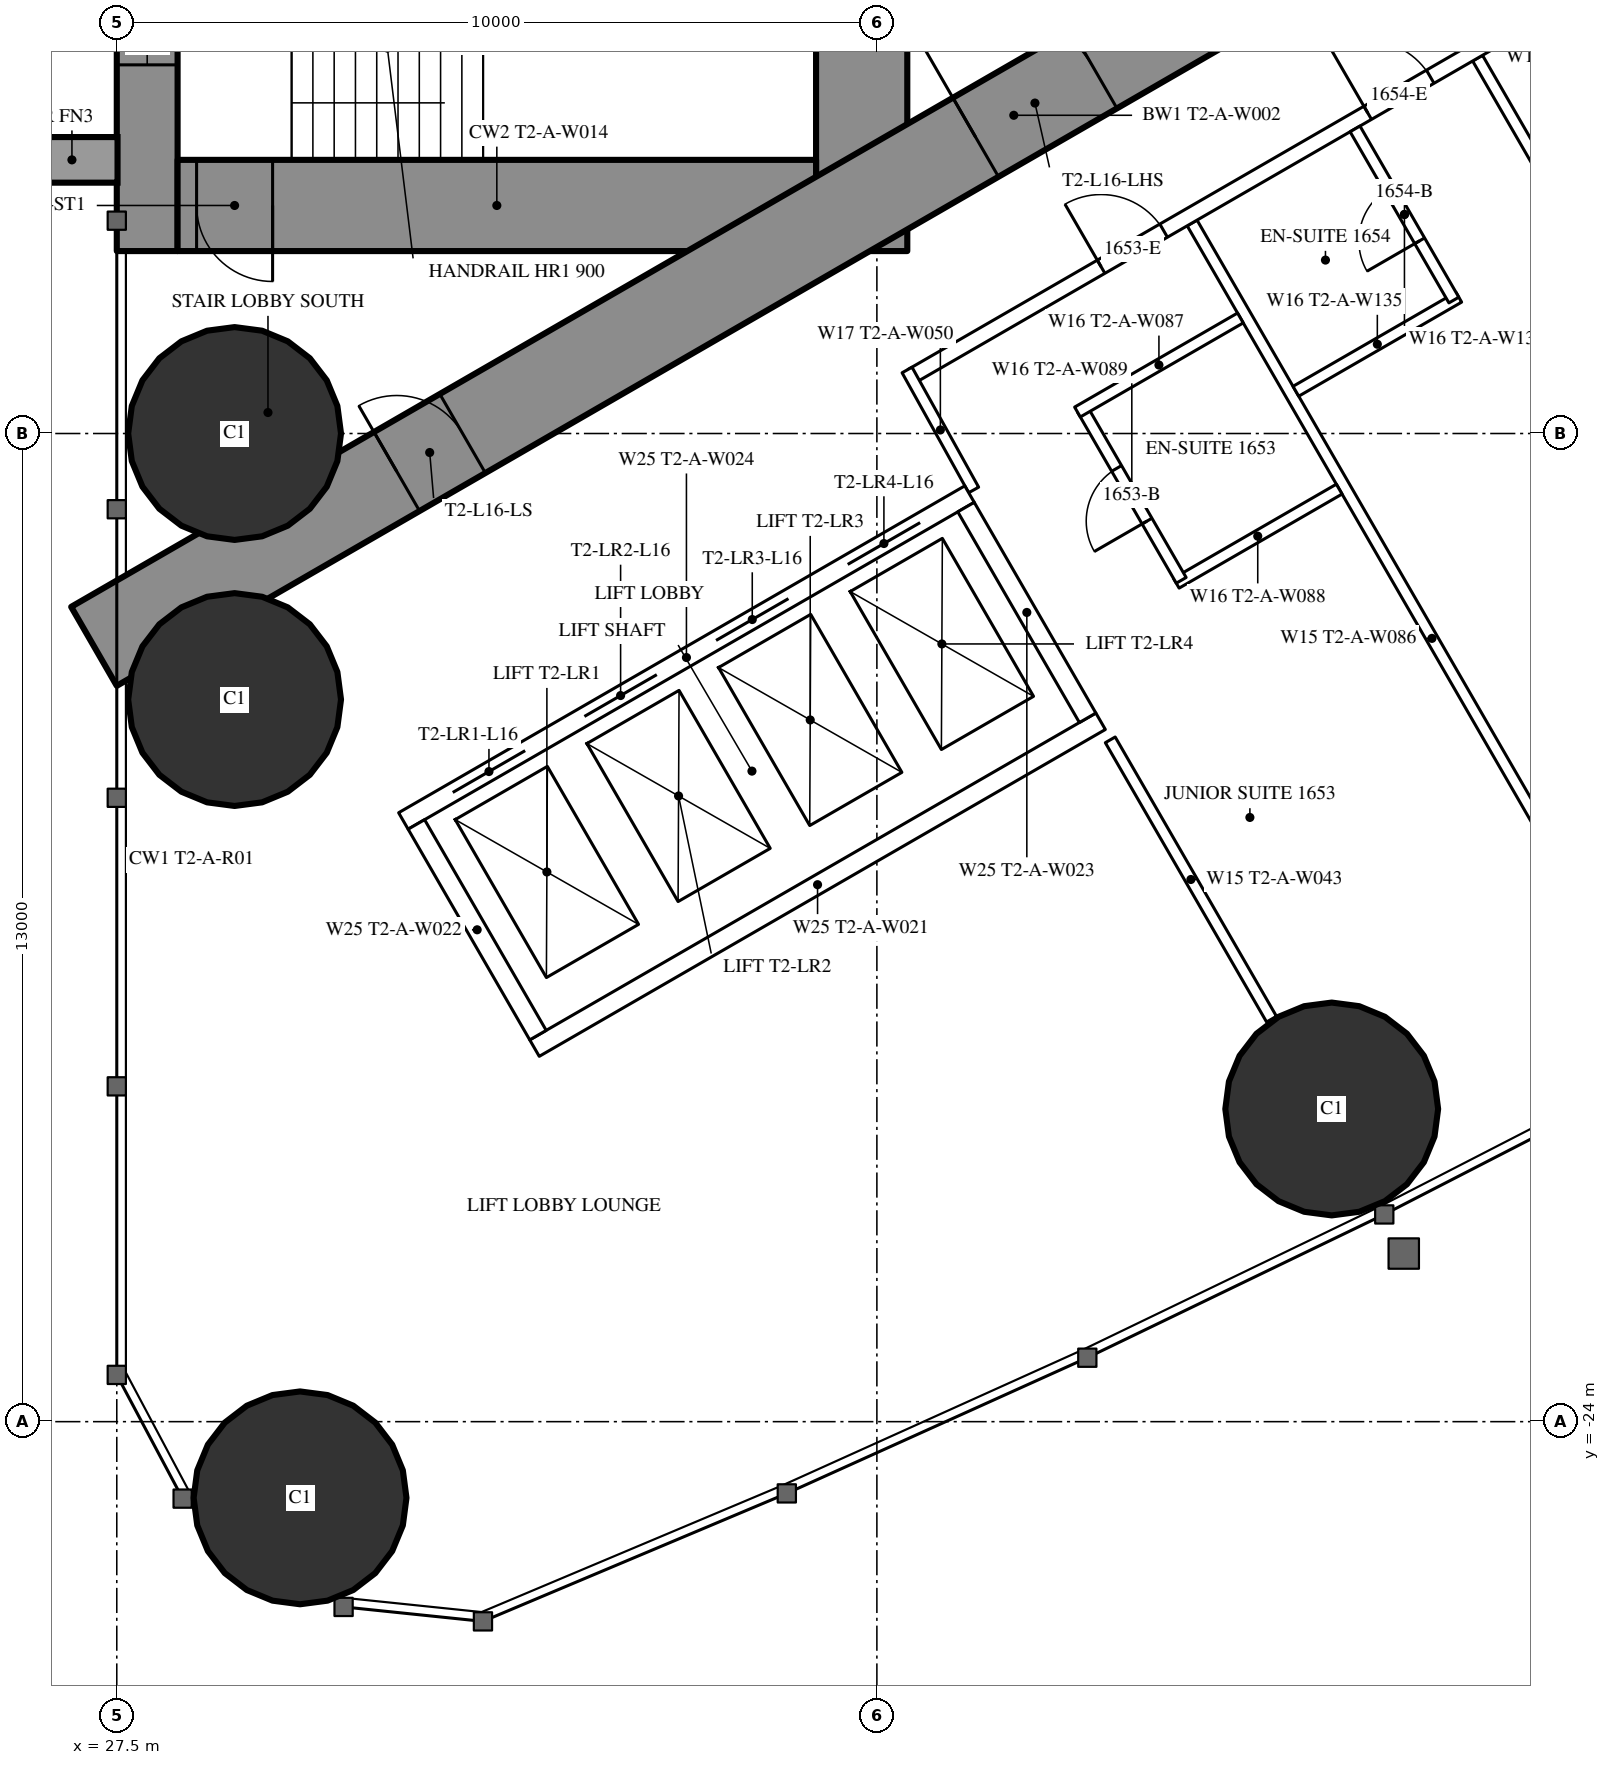
"""IFC4 building model, lengths in metres.
Left out: names, types, materials, properties, quantities, classifications, styles, units other than length and angle.
Written with IfcOpenShell. Run it as: python <this file> out.ifc"""

import sys

from ifc_helpers import new_model, si_unit, direction, frame, frame_2d, origin, origin_2d, place, context, subcontext, project, spatial, rectangle, hollow_circle, extrude, element, fill, save


model = new_model("IFC4")
c1 = context("Model", 3, precision=1e-05, world=origin(), true_north=direction((0.0, 1.0)))
c2 = subcontext(c1, "Body", "Model", "MODEL_VIEW")
j1 = project(units=[si_unit("LENGTHUNIT", "METRE"), si_unit("PLANEANGLEUNIT", "RADIAN")], contexts=[c1])
p1 = place(None, origin())
s1 = spatial("IfcSite", under=j1, at=p1, CompositionType="ELEMENT")
p2 = place(p1, origin())
s2 = spatial("IfcBuilding", under=s1, at=p2, CompositionType="ELEMENT")
p3 = place(p2, frame((0.0, 0.0, 63.5)))
s3 = spatial("IfcBuildingStorey", under=s2, at=p3, CompositionType="ELEMENT", Elevation=63.5)
for number, where, z_axis, x_axis in (
    (1, (29.911, -25.002, 0.0), (0.0, 0.0, 1.0), (1.0, 0.0, 0.0)),
    (2, (29.05, -11.0, 0.0), (0.0, 0.0, 1.0), (1.0, 0.0, 0.0)),
    (3, (29.05, -14.5, 0.0), (0.0, 0.0, 1.0), (1.0, 0.0, 0.0)),
    (4, (43.484, -19.886, 0.0), (0.0, 0.0, 1.0), (1.0, 0.0, 0.0)),
):
    element("IfcColumn", number, at=place(p3, frame(where, z_axis=z_axis, x_axis=x_axis)), inside=s3, PredefinedType="COLUMN", context=c2, shape_type="SweptSolid", body=[
        extrude(hollow_circle(Radius=1.4, WallThickness=0.12, at=origin_2d()), origin(), (0.0, 0.0, 1.0), 3.5),
    ])
p4 = place(p3, frame((27.9, -8.6, 0.0), z_axis=(0.0, 0.0, 1.0), x_axis=(0.0, 1.0, 0.0)))
e5 = element("IfcWall", 5, at=p4, inside=s3, PredefinedType="SHEAR", context=c2, shape_type="SweptSolid", body=[
    extrude(rectangle(XDim=17.2, YDim=0.8, at=frame_2d((8.6, 0.0))), origin(), (0.0, 0.0, 1.0), 3.5),
])
p5 = place(p4, frame((2.45, 0.0, 0.6)))
e6 = element("IfcOpeningElement", 6, at=p5, cuts=e5, PredefinedType="OPENING", context=c2, shape_type="SweptSolid", body=[
    extrude(rectangle(XDim=0.6, YDim=2.1, at=frame_2d((0.3, 1.05))), frame((0.0, 0.41, 0.0), z_axis=(0.0, -1.0, 0.0), x_axis=(1.0, 0.0, 0.0)), (0.0, 0.0, 1.0), 0.82),
])
p6 = place(p4, frame((14.15, 0.0, 0.6)))
e7 = element("IfcOpeningElement", 7, at=p6, cuts=e5, PredefinedType="OPENING", context=c2, shape_type="SweptSolid", body=[
    extrude(rectangle(XDim=0.6, YDim=2.1, at=frame_2d((0.3, 1.05))), frame((0.0, 0.41, 0.0), z_axis=(0.0, -1.0, 0.0), x_axis=(1.0, 0.0, 0.0)), (0.0, 0.0, 1.0), 0.82),
])
p7 = place(p3, frame((37.3, -8.6, 0.0), z_axis=(0.0, 0.0, 1.0), x_axis=(0.0, 1.0, 0.0)))
e8 = element("IfcWall", 8, at=p7, inside=s3, PredefinedType="SHEAR", context=c2, shape_type="SweptSolid", body=[
    extrude(rectangle(XDim=17.2, YDim=1.2, at=frame_2d((8.6, 0.0))), origin(), (0.0, 0.0, 1.0), 3.5),
])
p8 = place(p7, frame((7.7, 0.0, 0.0)))
e9 = element("IfcOpeningElement", 9, at=p8, cuts=e8, PredefinedType="OPENING", context=c2, shape_type="SweptSolid", body=[
    extrude(rectangle(XDim=1.8, YDim=2.2, at=frame_2d((0.9, 1.1))), frame((0.0, 0.61, 0.0), z_axis=(0.0, -1.0, 0.0), x_axis=(1.0, 0.0, 0.0)), (0.0, 0.0, 1.0), 1.22),
])
p9 = place(p3, frame((28.3, -8.0, 0.0), z_axis=(0.0, 0.0, 1.0), x_axis=(1.0, 0.0, 0.0)))
e10 = element("IfcWall", 10, at=p9, inside=s3, PredefinedType="SHEAR", context=c2, shape_type="SweptSolid", body=[
    extrude(rectangle(XDim=8.4, YDim=1.2, at=frame_2d((4.2, 0.0))), origin(), (0.0, 0.0, 1.0), 3.5),
])
p10 = place(p9, frame((0.25, 0.0, 0.0)))
e11 = element("IfcOpeningElement", 11, at=p10, cuts=e10, PredefinedType="OPENING", context=c2, shape_type="SweptSolid", body=[
    extrude(rectangle(XDim=1.0, YDim=2.2, at=frame_2d((0.5, 1.1))), frame((0.0, 0.61, 0.0), z_axis=(0.0, -1.0, 0.0), x_axis=(1.0, 0.0, 0.0)), (0.0, 0.0, 1.0), 1.22),
])
p11 = place(p3, frame((27.2, -13.8, 0.0), z_axis=(0.0, 0.0, 1.0), x_axis=(0.866027159892, 0.499996958321, 0.0)))
e12 = element("IfcWall", 12, at=p11, inside=s3, PredefinedType="SHEAR", context=c2, shape_type="SweptSolid", body=[
    extrude(rectangle(XDim=27.947, YDim=1.2, at=frame_2d((13.973, 0.0))), origin(), (0.0, 0.0, 1.0), 3.5),
])
p12 = place(p11, frame((4.6, 0.0, 0.0)))
e13 = element("IfcOpeningElement", 13, at=p12, cuts=e12, PredefinedType="OPENING", context=c2, shape_type="SweptSolid", body=[
    extrude(rectangle(XDim=1.0, YDim=2.2, at=frame_2d((0.5, 1.1))), frame((0.0, 0.61, 0.0), z_axis=(0.0, -1.0, 0.0), x_axis=(1.0, 0.0, 0.0)), (0.0, 0.0, 1.0), 1.22),
])
p13 = place(p11, frame((13.395, 0.0, 0.0)))
e14 = element("IfcOpeningElement", 14, at=p13, cuts=e12, PredefinedType="OPENING", context=c2, shape_type="SweptSolid", body=[
    extrude(rectangle(XDim=1.8, YDim=2.2, at=frame_2d((0.9, 1.1))), frame((0.0, 0.61, 0.0), z_axis=(0.0, -1.0, 0.0), x_axis=(1.0, 0.0, 0.0)), (0.0, 0.0, 1.0), 1.22),
])
p14 = place(p3, frame((41.647, -8.23, 0.0), z_axis=(0.0, 0.0, 1.0), x_axis=(0.49998590462, -0.866033541603, 0.0)))
e15 = element("IfcWall", 15, at=p14, inside=s3, PredefinedType="PARTITIONING", context=c2, shape_type="SweptSolid", body=[
    extrude(rectangle(XDim=12.621, YDim=0.15, at=frame_2d((6.311, 0.0))), origin(), (0.0, 0.0, 1.0), 3.25),
])
p15 = place(p3, frame((45.403, -6.062, 0.0), z_axis=(0.0, 0.0, 1.0), x_axis=(0.500007077968, -0.866021317279, 0.0)))
e16 = element("IfcWall", 16, at=p15, inside=s3, PredefinedType="PARTITIONING", context=c2, shape_type="SweptSolid", body=[
    extrude(rectangle(XDim=12.721, YDim=0.15, at=frame_2d((6.361, 0.0))), origin(), (0.0, 0.0, 1.0), 3.25),
])
p16 = place(p3, frame((40.57, -15.03, 0.0), z_axis=(0.0, 0.0, 1.0), x_axis=(0.500012993597, -0.866017901798, 0.0)))
e17 = element("IfcWall", 17, at=p16, inside=s3, PredefinedType="PARTITIONING", context=c2, shape_type="SweptSolid", body=[
    extrude(rectangle(XDim=4.243, YDim=0.15, at=frame_2d((2.122, 0.0))), origin(), (0.0, 0.0, 1.0), 3.25),
])
p17 = place(p3, frame((37.96, -10.243, 0.0), z_axis=(0.0, 0.0, 1.0), x_axis=(0.866026429433, 0.499998223521, 0.0)))
e18 = element("IfcWall", 18, at=p17, inside=s3, PredefinedType="PARTITIONING", context=c2, shape_type="SweptSolid", body=[
    extrude(rectangle(XDim=20.487, YDim=0.2, at=frame_2d((10.243, 0.0))), origin(), (0.0, 0.0, 1.0), 3.25),
])
p18 = place(p17, frame((6.925, 0.0, 0.0)))
e19 = element("IfcOpeningElement", 19, at=p18, cuts=e18, PredefinedType="OPENING", context=c2, shape_type="SweptSolid", body=[
    extrude(rectangle(XDim=0.95, YDim=2.2, at=frame_2d((0.475, 1.1))), frame((0.0, 0.11, 0.0), z_axis=(0.0, -1.0, 0.0), x_axis=(1.0, 0.0, 0.0)), (0.0, 0.0, 1.0), 0.22),
])
p19 = place(p17, frame((8.912, 0.0, 0.0)))
e20 = element("IfcOpeningElement", 20, at=p19, cuts=e18, PredefinedType="OPENING", context=c2, shape_type="SweptSolid", body=[
    extrude(rectangle(XDim=0.95, YDim=2.2, at=frame_2d((0.475, 1.1))), frame((0.0, 0.11, 0.0), z_axis=(0.0, -1.0, 0.0), x_axis=(1.0, 0.0, 0.0)), (0.0, 0.0, 1.0), 0.22),
])
p20 = place(p17, frame((13.535, 0.0, 0.0)))
e21 = element("IfcOpeningElement", 21, at=p20, cuts=e18, PredefinedType="OPENING", context=c2, shape_type="SweptSolid", body=[
    extrude(rectangle(XDim=0.95, YDim=2.2, at=frame_2d((0.475, 1.1))), frame((0.0, 0.11, 0.0), z_axis=(0.0, -1.0, 0.0), x_axis=(1.0, 0.0, 0.0)), (0.0, 0.0, 1.0), 0.22),
])
p21 = place(p17, frame((17.585, 0.0, 0.0)))
e22 = element("IfcOpeningElement", 22, at=p21, cuts=e18, PredefinedType="OPENING", context=c2, shape_type="SweptSolid", body=[
    extrude(rectangle(XDim=0.95, YDim=2.2, at=frame_2d((0.475, 1.1))), frame((0.0, 0.11, 0.0), z_axis=(0.0, -1.0, 0.0), x_axis=(1.0, 0.0, 0.0)), (0.0, 0.0, 1.0), 0.22),
])
p22 = place(p17, frame((2.875, 0.0, 0.0)))
e23 = element("IfcOpeningElement", 23, at=p22, cuts=e18, PredefinedType="OPENING", context=c2, shape_type="SweptSolid", body=[
    extrude(rectangle(XDim=0.95, YDim=2.2, at=frame_2d((0.475, 1.1))), frame((0.0, 0.11, 0.0), z_axis=(0.0, -1.0, 0.0), x_axis=(1.0, 0.0, 0.0)), (0.0, 0.0, 1.0), 0.22),
])
p23 = place(p3, frame((38.773, -11.742, 0.0), z_axis=(0.0, 0.0, 1.0), x_axis=(-0.485528096672, 0.8742210632, 0.0)))
e24 = element("IfcWall", 24, at=p23, inside=s3, PredefinedType="PARTITIONING", context=c2, shape_type="SweptSolid", body=[
    extrude(rectangle(XDim=1.805, YDim=0.15, at=frame_2d((0.903, 0.0))), origin(), (0.0, 0.0, 1.0), 3.25),
])
p24 = place(p3, frame((43.012, -10.444, 0.0), z_axis=(0.0, 0.0, 1.0), x_axis=(0.866031185235, 0.4999899861, 0.0)))
e25 = element("IfcWall", 25, at=p24, inside=s3, PredefinedType="PARTITIONING", context=c2, shape_type="SweptSolid", body=[
    extrude(rectangle(XDim=2.475, YDim=0.15, at=frame_2d((1.238, 0.0))), origin(), (0.0, 0.0, 1.0), 3.25),
])
p25 = place(p3, frame((43.791, -6.993, 0.0), z_axis=(0.0, 0.0, 1.0), x_axis=(0.500047596559, -0.865997922154, 0.0)))
e26 = element("IfcWall", 26, at=p25, inside=s3, PredefinedType="PARTITIONING", context=c2, shape_type="SweptSolid", body=[
    extrude(rectangle(XDim=2.6, YDim=0.15, at=frame_2d((1.3, 0.0))), origin(), (0.0, 0.0, 1.0), 3.25),
])
p26 = place(p25, frame((0.9, 0.0, 0.0)))
e27 = element("IfcOpeningElement", 27, at=p26, cuts=e26, PredefinedType="OPENING", context=c2, shape_type="SweptSolid", body=[
    extrude(rectangle(XDim=0.8, YDim=2.2, at=frame_2d((0.4, 1.1))), frame((0.0, 0.085, 0.0), z_axis=(0.0, -1.0, 0.0), x_axis=(1.0, 0.0, 0.0)), (0.0, 0.0, 1.0), 0.17),
])
p27 = place(p3, frame((41.439, -12.969, 0.0), z_axis=(0.0, 0.0, 1.0), x_axis=(0.866031185235, 0.4999899861, 0.0)))
e28 = element("IfcWall", 28, at=p27, inside=s3, PredefinedType="PARTITIONING", context=c2, shape_type="SweptSolid", body=[
    extrude(rectangle(XDim=2.475, YDim=0.15, at=frame_2d((1.238, 0.0))), origin(), (0.0, 0.0, 1.0), 3.25),
])
p28 = place(p3, frame((40.204, -10.68, 0.0), z_axis=(0.0, 0.0, 1.0), x_axis=(0.500006934395, -0.866021400173, 0.0)))
e29 = element("IfcWall", 29, at=p28, inside=s3, PredefinedType="PARTITIONING", context=c2, shape_type="SweptSolid", body=[
    extrude(rectangle(XDim=2.6, YDim=0.15, at=frame_2d((1.3, 0.0))), origin(), (0.0, 0.0, 1.0), 3.25),
])
p29 = place(p28, frame((0.9, 0.0, 0.0)))
e30 = element("IfcOpeningElement", 30, at=p29, cuts=e29, PredefinedType="OPENING", context=c2, shape_type="SweptSolid", body=[
    extrude(rectangle(XDim=0.8, YDim=2.2, at=frame_2d((0.4, 1.1))), frame((0.0, 0.085, 0.0), z_axis=(0.0, -1.0, 0.0), x_axis=(1.0, 0.0, 0.0)), (0.0, 0.0, 1.0), 0.17),
])
p30 = place(p3, frame((40.139, -10.718, 0.0), z_axis=(0.0, 0.0, 1.0), x_axis=(0.866031185235, 0.4999899861, 0.0)))
e31 = element("IfcWall", 31, at=p30, inside=s3, PredefinedType="PARTITIONING", context=c2, shape_type="SweptSolid", body=[
    extrude(rectangle(XDim=2.475, YDim=0.15, at=frame_2d((1.238, 0.0))), origin(), (0.0, 0.0, 1.0), 3.25),
])
p31 = place(p3, frame((31.271, -16.097, 0.0), z_axis=(0.0, 0.0, 1.0), x_axis=(0.86604045752, 0.499973925258, 0.0)))
e32 = element("IfcWall", 32, at=p31, inside=s3, PredefinedType="PARTITIONING", context=c2, shape_type="SweptSolid", body=[
    extrude(rectangle(XDim=8.6, YDim=0.25, at=frame_2d((4.3, 0.0))), origin(), (0.0, 0.0, 1.0), 3.25),
])
p32 = place(p31, frame((0.75, 0.0, 0.0)))
e33 = element("IfcOpeningElement", 33, at=p32, cuts=e32, PredefinedType="OPENING", context=c2, shape_type="SweptSolid", body=[
    extrude(rectangle(XDim=1.1, YDim=2.2, at=frame_2d((0.55, 1.1))), frame((0.0, 0.135, 0.0), z_axis=(0.0, -1.0, 0.0), x_axis=(1.0, 0.0, 0.0)), (0.0, 0.0, 1.0), 0.27),
])
p33 = place(p31, frame((2.75, 0.0, 0.0)))
e34 = element("IfcOpeningElement", 34, at=p33, cuts=e32, PredefinedType="OPENING", context=c2, shape_type="SweptSolid", body=[
    extrude(rectangle(XDim=1.1, YDim=2.2, at=frame_2d((0.55, 1.1))), frame((0.0, 0.135, 0.0), z_axis=(0.0, -1.0, 0.0), x_axis=(1.0, 0.0, 0.0)), (0.0, 0.0, 1.0), 0.27),
])
p34 = place(p31, frame((4.75, 0.0, 0.0)))
e35 = element("IfcOpeningElement", 35, at=p34, cuts=e32, PredefinedType="OPENING", context=c2, shape_type="SweptSolid", body=[
    extrude(rectangle(XDim=1.1, YDim=2.2, at=frame_2d((0.55, 1.1))), frame((0.0, 0.135, 0.0), z_axis=(0.0, -1.0, 0.0), x_axis=(1.0, 0.0, 0.0)), (0.0, 0.0, 1.0), 0.27),
])
p35 = place(p31, frame((6.75, 0.0, 0.0)))
e36 = element("IfcOpeningElement", 36, at=p35, cuts=e32, PredefinedType="OPENING", context=c2, shape_type="SweptSolid", body=[
    extrude(rectangle(XDim=1.1, YDim=2.2, at=frame_2d((0.55, 1.1))), frame((0.0, 0.135, 0.0), z_axis=(0.0, -1.0, 0.0), x_axis=(1.0, 0.0, 0.0)), (0.0, 0.0, 1.0), 0.27),
])
p36 = place(p3, frame((32.996, -19.086, 0.0), z_axis=(0.0, 0.0, 1.0), x_axis=(0.866028165386, 0.499995216735, 0.0)))
e37 = element("IfcWall", 37, at=p36, inside=s3, PredefinedType="PARTITIONING", context=c2, shape_type="SweptSolid", body=[
    extrude(rectangle(XDim=8.6, YDim=0.25, at=frame_2d((4.3, 0.0))), origin(), (0.0, 0.0, 1.0), 3.25),
])
for number, where, z_axis, x_axis in (
    (38, (31.441, -16.143, 0.0), (0.0, 0.0, 1.0), (0.5, -0.866, 0.0)),
    (39, (38.673, -11.968, 0.0), (0.0, 0.0, 1.0), (0.5, -0.866, 0.0)),
):
    element("IfcWall", number, at=place(p3, frame(where, z_axis=z_axis, x_axis=x_axis)), inside=s3, PredefinedType="PARTITIONING", context=c2, shape_type="SweptSolid", body=[
        extrude(rectangle(XDim=3.201, YDim=0.25, at=frame_2d((1.6, 0.0))), origin(), (0.0, 0.0, 1.0), 3.25),
    ])
p37 = place(p26, origin())
e40 = element("IfcDoor", 40, at=p37, inside=s3, OperationType="SINGLE_SWING_RIGHT", PredefinedType="DOOR", context=c2, shape_type="SweptSolid", body=[
    extrude(rectangle(XDim=0.8, YDim=2.2, at=frame_2d((0.4, 1.1))), frame((0.0, 0.025, 0.0), z_axis=(0.0, -1.0, 0.0), x_axis=(1.0, 0.0, 0.0)), (0.0, 0.0, 1.0), 0.05),
])
fill(e27, e40)
p38 = place(p18, origin())
e41 = element("IfcDoor", 41, at=p38, inside=s3, OperationType="SINGLE_SWING_LEFT", PredefinedType="DOOR", context=c2, shape_type="SweptSolid", body=[
    extrude(rectangle(XDim=0.95, YDim=2.2, at=frame_2d((0.475, 1.1))), frame((0.0, 0.025, 0.0), z_axis=(0.0, -1.0, 0.0), x_axis=(1.0, 0.0, 0.0)), (0.0, 0.0, 1.0), 0.05),
])
fill(e19, e41)
p39 = place(p29, origin())
e42 = element("IfcDoor", 42, at=p39, inside=s3, OperationType="SINGLE_SWING_RIGHT", PredefinedType="DOOR", context=c2, shape_type="SweptSolid", body=[
    extrude(rectangle(XDim=0.8, YDim=2.2, at=frame_2d((0.4, 1.1))), frame((0.0, 0.025, 0.0), z_axis=(0.0, -1.0, 0.0), x_axis=(1.0, 0.0, 0.0)), (0.0, 0.0, 1.0), 0.05),
])
fill(e30, e42)
p40 = place(p22, origin())
e43 = element("IfcDoor", 43, at=p40, inside=s3, OperationType="SINGLE_SWING_LEFT", PredefinedType="DOOR", context=c2, shape_type="SweptSolid", body=[
    extrude(rectangle(XDim=0.95, YDim=2.2, at=frame_2d((0.475, 1.1))), frame((0.0, 0.025, 0.0), z_axis=(0.0, -1.0, 0.0), x_axis=(1.0, 0.0, 0.0)), (0.0, 0.0, 1.0), 0.05),
])
fill(e23, e43)
p41 = place(p12, origin())
e44 = element("IfcDoor", 44, at=p41, inside=s3, OperationType="SINGLE_SWING_LEFT", PredefinedType="DOOR", context=c2, shape_type="SweptSolid", body=[
    extrude(rectangle(XDim=1.0, YDim=2.2, at=frame_2d((0.5, 1.1))), frame((0.0, 0.025, 0.0), z_axis=(0.0, -1.0, 0.0), x_axis=(1.0, 0.0, 0.0)), (0.0, 0.0, 1.0), 0.05),
])
fill(e13, e44)
p42 = place(p13, origin())
e45 = element("IfcDoor", 45, at=p42, inside=s3, OperationType="DOUBLE_DOOR_SINGLE_SWING", PredefinedType="DOOR", context=c2, shape_type="SweptSolid", body=[
    extrude(rectangle(XDim=1.8, YDim=2.2, at=frame_2d((0.9, 1.1))), frame((0.0, 0.025, 0.0), z_axis=(0.0, -1.0, 0.0), x_axis=(1.0, 0.0, 0.0)), (0.0, 0.0, 1.0), 0.05),
])
fill(e14, e45)
p43 = place(p10, origin())
e46 = element("IfcDoor", 46, at=p43, inside=s3, OperationType="SINGLE_SWING_RIGHT", PredefinedType="DOOR", context=c2, shape_type="SweptSolid", body=[
    extrude(rectangle(XDim=1.0, YDim=2.2, at=frame_2d((0.5, 1.1))), frame((0.0, 0.025, 0.0), z_axis=(0.0, -1.0, 0.0), x_axis=(1.0, 0.0, 0.0)), (0.0, 0.0, 1.0), 0.05),
])
fill(e11, e46)
p44 = place(p32, origin())
e47 = element("IfcDoor", 47, at=p44, inside=s3, OperationType="DOUBLE_DOOR_SLIDING", PredefinedType="USERDEFINED", context=c2, shape_type="SweptSolid", body=[
    extrude(rectangle(XDim=1.1, YDim=2.2, at=frame_2d((0.55, 1.1))), frame((0.0, 0.025, 0.0), z_axis=(0.0, -1.0, 0.0), x_axis=(1.0, 0.0, 0.0)), (0.0, 0.0, 1.0), 0.05),
])
fill(e33, e47)
p45 = place(p33, origin())
e48 = element("IfcDoor", 48, at=p45, inside=s3, OperationType="DOUBLE_DOOR_SLIDING", PredefinedType="USERDEFINED", context=c2, shape_type="SweptSolid", body=[
    extrude(rectangle(XDim=1.1, YDim=2.2, at=frame_2d((0.55, 1.1))), frame((0.0, 0.025, 0.0), z_axis=(0.0, -1.0, 0.0), x_axis=(1.0, 0.0, 0.0)), (0.0, 0.0, 1.0), 0.05),
])
fill(e34, e48)
p46 = place(p34, origin())
e49 = element("IfcDoor", 49, at=p46, inside=s3, OperationType="DOUBLE_DOOR_SLIDING", PredefinedType="USERDEFINED", context=c2, shape_type="SweptSolid", body=[
    extrude(rectangle(XDim=1.1, YDim=2.2, at=frame_2d((0.55, 1.1))), frame((0.0, 0.025, 0.0), z_axis=(0.0, -1.0, 0.0), x_axis=(1.0, 0.0, 0.0)), (0.0, 0.0, 1.0), 0.05),
])
fill(e35, e49)
p47 = place(p35, origin())
e50 = element("IfcDoor", 50, at=p47, inside=s3, OperationType="DOUBLE_DOOR_SLIDING", PredefinedType="USERDEFINED", context=c2, shape_type="SweptSolid", body=[
    extrude(rectangle(XDim=1.1, YDim=2.2, at=frame_2d((0.55, 1.1))), frame((0.0, 0.025, 0.0), z_axis=(0.0, -1.0, 0.0), x_axis=(1.0, 0.0, 0.0)), (0.0, 0.0, 1.0), 0.05),
])
fill(e36, e50)
p48 = place(p5, origin())
e51 = element("IfcWindow", 51, at=p48, inside=s3, PartitioningType="SINGLE_PANEL", PredefinedType="WINDOW", context=c2, shape_type="SweptSolid", body=[
    extrude(rectangle(XDim=0.6, YDim=2.1, at=frame_2d((0.3, 1.05))), frame((0.0, 0.03, 0.0), z_axis=(0.0, -1.0, 0.0), x_axis=(1.0, 0.0, 0.0)), (0.0, 0.0, 1.0), 0.06),
])
fill(e6, e51)
save(model, sys.argv[1])
